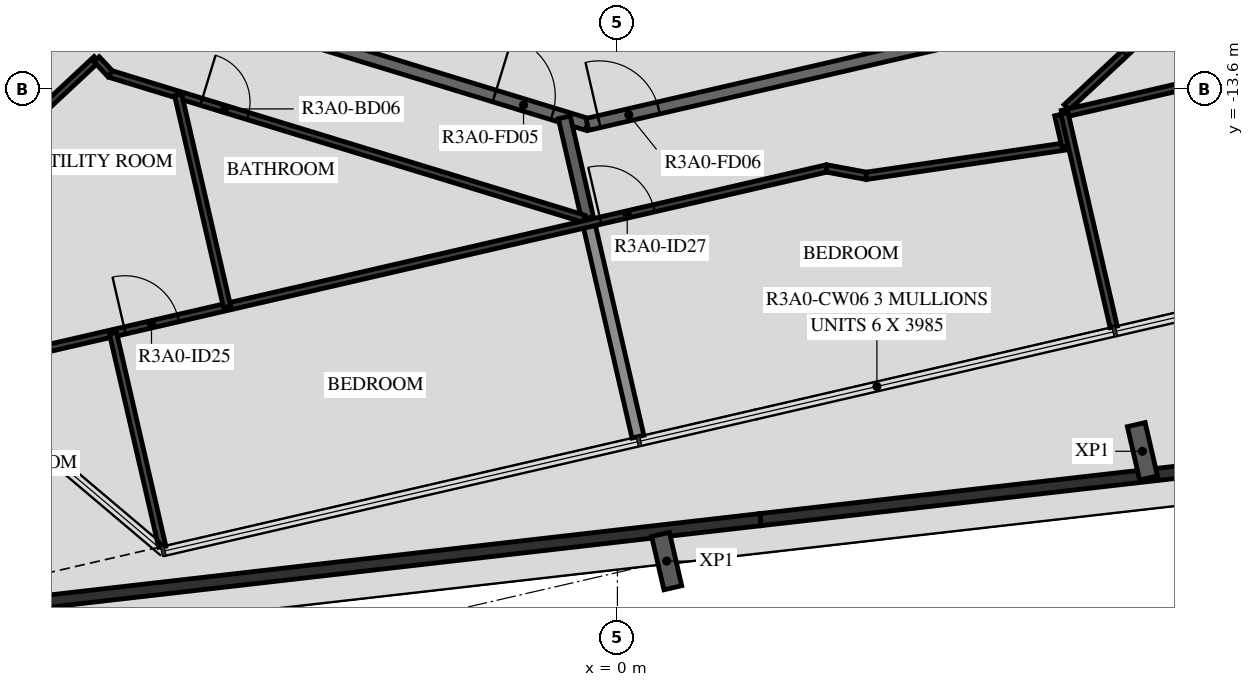
"""IFC4 building model, lengths in metres.
Left out: names, types, materials, properties, quantities, classifications, styles, units other than length and angle.
Written with IfcOpenShell. Run it as: python <this file> out.ifc"""

import sys

from ifc_helpers import new_model, si_unit, direction, frame, frame_2d, origin, origin_2d, place, context, subcontext, project, spatial, rectangle, i_section, extrude, element, fill, save


model = new_model("IFC4")
c1 = context("Model", 3, precision=1e-05, world=origin(), true_north=direction((0.0, 1.0)))
c2 = subcontext(c1, "Body", "Model", "MODEL_VIEW")
j1 = project(units=[si_unit("LENGTHUNIT", "METRE"), si_unit("PLANEANGLEUNIT", "RADIAN")], contexts=[c1])
p1 = place(None, origin())
s1 = spatial("IfcSite", under=j1, at=p1, CompositionType="ELEMENT")
p2 = place(p1, origin())
s2 = spatial("IfcBuilding", under=s1, at=p2, CompositionType="ELEMENT")
p3 = place(p2, frame((0.0, 0.0, 113.4)))
s3 = spatial("IfcBuildingStorey", under=s2, at=p3, CompositionType="ELEMENT", Elevation=113.4)
for number, where, z_axis, x_axis in (
    (1, (8.634, -19.55, -0.45), (0.0, 0.0, 1.0), (-0.974, -0.225, 0.0)),
    (2, (0.81, -21.356, -0.45), (0.0, 0.0, 1.0), (-0.974, -0.225, 0.0)),
):
    element("IfcColumn", number, at=place(p3, frame(where, z_axis=z_axis, x_axis=x_axis)), inside=s3, PredefinedType="COLUMN", context=c2, shape_type="SweptSolid", body=[
        extrude(i_section(OverallWidth=0.3, OverallDepth=0.9, WebThickness=0.019, FlangeThickness=0.035, FilletRadius=0.03, at=origin_2d()), origin(), (0.0, 0.0, 1.0), 3.57),
    ])
p4 = place(p3, frame((2.355, -20.674, 0.03), z_axis=(0.0, 0.0, 1.0), x_axis=(-0.993501379632, -0.11382007147, 0.0)))
e3 = element("IfcWall", 3, at=p4, inside=s3, PredefinedType="PARAPET", context=c2, shape_type="SweptSolid", body=[
    extrude(rectangle(XDim=15.836, YDim=0.2, at=frame_2d((7.918, 0.0))), origin(), (0.0, 0.0, 1.0), 1.5),
])
p5 = place(p3, frame((21.7, -18.47, 0.03), z_axis=(0.0, 0.0, 1.0), x_axis=(-0.993571254811, -0.113208487372, 0.0)))
e4 = element("IfcWall", 4, at=p5, inside=s3, PredefinedType="PARAPET", context=c2, shape_type="SweptSolid", body=[
    extrude(rectangle(XDim=19.469, YDim=0.2, at=frame_2d((9.735, 0.0))), origin(), (0.0, 0.0, 1.0), 1.5),
])
p6 = place(p3, frame((-7.516, -12.028, 0.0), z_axis=(0.0, 0.0, 1.0), x_axis=(0.956306642771, -0.292365533182, 0.0)))
e5 = element("IfcWall", 5, at=p6, inside=s3, PredefinedType="STANDARD", context=c2, shape_type="SweptSolid", body=[
    extrude(rectangle(XDim=7.342, YDim=0.2, at=frame_2d((3.671, 0.0))), origin(), (0.0, 0.0, 1.0), 3.12),
])
p7 = place(p6, frame((5.745, 0.0, 0.0)))
e6 = element("IfcOpeningElement", 6, at=p7, cuts=e5, PredefinedType="OPENING", context=c2, shape_type="SweptSolid", body=[
    extrude(rectangle(XDim=1.0, YDim=2.1, at=frame_2d((0.5, 1.05))), frame((0.0, 0.11, 0.0), z_axis=(0.0, -1.0, 0.0), x_axis=(1.0, 0.0, 0.0)), (0.0, 0.0, 1.0), 0.22),
])
p8 = place(p3, frame((-0.495, -14.175, 0.0), z_axis=(0.0, 0.0, 1.0), x_axis=(0.974376622151, 0.224922649383, 0.0)))
e7 = element("IfcWall", 7, at=p8, inside=s3, PredefinedType="STANDARD", context=c2, shape_type="SweptSolid", body=[
    extrude(rectangle(XDim=7.342, YDim=0.2, at=frame_2d((3.671, 0.0))), origin(), (0.0, 0.0, 1.0), 3.12),
])
p9 = place(p8, frame((0.2, 0.0, 0.0)))
e8 = element("IfcOpeningElement", 8, at=p9, cuts=e7, PredefinedType="OPENING", context=c2, shape_type="SweptSolid", body=[
    extrude(rectangle(XDim=1.0, YDim=2.1, at=frame_2d((0.5, 1.05))), frame((0.0, 0.11, 0.0), z_axis=(0.0, -1.0, 0.0), x_axis=(1.0, 0.0, 0.0)), (0.0, 0.0, 1.0), 0.22),
])
p10 = place(p3, frame((-0.492, -15.713, 0.0), z_axis=(0.0, 0.0, 1.0), x_axis=(-0.224974992875, 0.97436453783, 0.0)))
e9 = element("IfcWall", 9, at=p10, inside=s3, PredefinedType="STANDARD", context=c2, shape_type="SweptSolid", body=[
    extrude(rectangle(XDim=1.698, YDim=0.2, at=frame_2d((0.849, 0.0))), origin(), (0.0, 0.0, 1.0), 3.12),
])
p11 = place(p3, frame((0.338, -19.31, 0.0), z_axis=(0.0, 0.0, 1.0), x_axis=(-0.224943703639, 0.9743717618, 0.0)))
e10 = element("IfcWall", 10, at=p11, inside=s3, PredefinedType="STANDARD", context=c2, shape_type="SweptSolid", body=[
    extrude(rectangle(XDim=3.6, YDim=0.2, at=frame_2d((1.8, 0.0))), origin(), (0.0, 0.0, 1.0), 2.73),
])
p12 = place(p3, frame((-11.783, -16.104, 0.0), z_axis=(0.0, 0.0, 1.0), x_axis=(0.731365154613, 0.681986078023, 0.0)))
e11 = element("IfcWall", 11, at=p12, inside=s3, PredefinedType="PARTITIONING", context=c2, shape_type="SweptSolid", body=[
    extrude(rectangle(XDim=4.4, YDim=0.12, at=frame_2d((2.2, 0.0))), origin(), (0.0, 0.0, 1.0), 3.12),
])
p13 = place(p3, frame((-8.565, -13.103, 0.0), z_axis=(0.0, 0.0, 1.0), x_axis=(0.681636048219, -0.731691395172, 0.0)))
e12 = element("IfcWall", 12, at=p13, inside=s3, PredefinedType="PARTITIONING", context=c2, shape_type="SweptSolid", body=[
    extrude(rectangle(XDim=0.332, YDim=0.12, at=frame_2d((0.166, 0.0))), origin(), (0.0, 0.0, 1.0), 3.12),
])
p14 = place(p3, frame((-8.339, -13.345, 0.0), z_axis=(0.0, 0.0, 1.0), x_axis=(0.956310145342, -0.292354076276, 0.0)))
e13 = element("IfcWall", 13, at=p14, inside=s3, PredefinedType="PARTITIONING", context=c2, shape_type="SweptSolid", body=[
    extrude(rectangle(XDim=8.146, YDim=0.12, at=frame_2d((4.073, 0.0))), origin(), (0.0, 0.0, 1.0), 3.12),
])
p15 = place(p14, frame((1.565, 0.0, 0.0)))
e14 = element("IfcOpeningElement", 14, at=p15, cuts=e13, PredefinedType="OPENING", context=c2, shape_type="SweptSolid", body=[
    extrude(rectangle(XDim=0.8, YDim=2.1, at=frame_2d((0.4, 1.05))), frame((0.0, 0.07, 0.0), z_axis=(0.0, -1.0, 0.0), x_axis=(1.0, 0.0, 0.0)), (0.0, 0.0, 1.0), 0.14),
])
p16 = place(p3, frame((-14.736, -19.095, 0.0), z_axis=(0.0, 0.0, 1.0), x_axis=(0.974369132722, 0.224955091516, 0.0)))
e15 = element("IfcWall", 15, at=p16, inside=s3, PredefinedType="PARTITIONING", context=c2, shape_type="SweptSolid", body=[
    extrude(rectangle(XDim=18.654, YDim=0.12, at=frame_2d((9.327, 0.0))), origin(), (0.0, 0.0, 1.0), 3.12),
])
p17 = place(p16, frame((3.383, 0.0, 0.0)))
e16 = element("IfcOpeningElement", 16, at=p17, cuts=e15, PredefinedType="OPENING", context=c2, shape_type="SweptSolid", body=[
    extrude(rectangle(XDim=0.9, YDim=2.1, at=frame_2d((0.45, 1.05))), frame((0.0, 0.07, 0.0), z_axis=(0.0, -1.0, 0.0), x_axis=(1.0, 0.0, 0.0)), (0.0, 0.0, 1.0), 0.14),
])
p18 = place(p16, frame((6.81, 0.0, 0.0)))
e17 = element("IfcOpeningElement", 17, at=p18, cuts=e15, PredefinedType="OPENING", context=c2, shape_type="SweptSolid", body=[
    extrude(rectangle(XDim=0.9, YDim=2.1, at=frame_2d((0.45, 1.05))), frame((0.0, 0.07, 0.0), z_axis=(0.0, -1.0, 0.0), x_axis=(1.0, 0.0, 0.0)), (0.0, 0.0, 1.0), 0.14),
])
p19 = place(p16, frame((0.2, 0.0, 0.0)))
e18 = element("IfcOpeningElement", 18, at=p19, cuts=e15, PredefinedType="OPENING", context=c2, shape_type="SweptSolid", body=[
    extrude(rectangle(XDim=0.9, YDim=2.1, at=frame_2d((0.45, 1.05))), frame((0.0, 0.07, 0.0), z_axis=(0.0, -1.0, 0.0), x_axis=(1.0, 0.0, 0.0)), (0.0, 0.0, 1.0), 0.14),
])
p20 = place(p16, frame((14.839, 0.0, 0.0)))
e19 = element("IfcOpeningElement", 19, at=p20, cuts=e15, PredefinedType="OPENING", context=c2, shape_type="SweptSolid", body=[
    extrude(rectangle(XDim=0.9, YDim=2.1, at=frame_2d((0.45, 1.05))), frame((0.0, 0.07, 0.0), z_axis=(0.0, -1.0, 0.0), x_axis=(1.0, 0.0, 0.0)), (0.0, 0.0, 1.0), 0.14),
])
p21 = place(p3, frame((-6.419, -17.175, 0.0), z_axis=(0.0, 0.0, 1.0), x_axis=(-0.224979003559, 0.974363611778, 0.0)))
e20 = element("IfcWall", 20, at=p21, inside=s3, PredefinedType="PARTITIONING", context=c2, shape_type="SweptSolid", body=[
    extrude(rectangle(XDim=3.581, YDim=0.12, at=frame_2d((1.791, 0.0))), origin(), (0.0, 0.0, 1.0), 3.12),
])
p22 = place(p3, frame((-7.486, -21.116, 0.0), z_axis=(0.0, 0.0, 1.0), x_axis=(-0.224943703639, 0.9743717618, 0.0)))
e21 = element("IfcWall", 21, at=p22, inside=s3, PredefinedType="PARTITIONING", context=c2, shape_type="SweptSolid", body=[
    extrude(rectangle(XDim=3.6, YDim=0.12, at=frame_2d((1.8, 0.0))), origin(), (0.0, 0.0, 1.0), 2.73),
])
p23 = place(p3, frame((3.44, -14.899, 0.0), z_axis=(0.0, 0.0, 1.0), x_axis=(0.98314539863, -0.182825395264, 0.0)))
e22 = element("IfcWall", 22, at=p23, inside=s3, PredefinedType="PARTITIONING", context=c2, shape_type="SweptSolid", body=[
    extrude(rectangle(XDim=0.665, YDim=0.12, at=frame_2d((0.333, 0.0))), origin(), (0.0, 0.0, 1.0), 3.12),
])
p24 = place(p3, frame((4.094, -15.021, 0.0), z_axis=(0.0, 0.0, 1.0), x_axis=(0.989259616433, 0.146169118814, 0.0)))
e23 = element("IfcWall", 23, at=p24, inside=s3, PredefinedType="PARTITIONING", context=c2, shape_type="SweptSolid", body=[
    extrude(rectangle(XDim=3.311, YDim=0.12, at=frame_2d((1.655, 0.0))), origin(), (0.0, 0.0, 1.0), 3.12),
])
p25 = place(p3, frame((7.368, -14.537, 0.0), z_axis=(0.0, 0.0, 1.0), x_axis=(-0.224960301109, 0.974367929955, 0.0)))
e24 = element("IfcWall", 24, at=p25, inside=s3, PredefinedType="PARTITIONING", context=c2, shape_type="SweptSolid", body=[
    extrude(rectangle(XDim=0.531, YDim=0.12, at=frame_2d((0.265, 0.0))), origin(), (0.0, 0.0, 1.0), 3.12),
])
p26 = place(p3, frame((7.388, -13.894, 0.0), z_axis=(0.0, 0.0, 1.0), x_axis=(0.731339966659, 0.682013088707, 0.0)))
e25 = element("IfcWall", 25, at=p26, inside=s3, PredefinedType="PARTITIONING", context=c2, shape_type="SweptSolid", body=[
    extrude(rectangle(XDim=6.899, YDim=0.12, at=frame_2d((3.45, 0.0))), origin(), (0.0, 0.0, 1.0), 3.12),
])
p27 = place(p26, frame((1.3, 0.0, 0.0)))
e26 = element("IfcOpeningElement", 26, at=p27, cuts=e25, PredefinedType="OPENING", context=c2, shape_type="SweptSolid", body=[
    extrude(rectangle(XDim=0.8, YDim=2.1, at=frame_2d((0.4, 1.05))), frame((0.0, 0.07, 0.0), z_axis=(0.0, -1.0, 0.0), x_axis=(1.0, 0.0, 0.0)), (0.0, 0.0, 1.0), 0.14),
])
p28 = place(p3, frame((7.312, -14.005, 0.0), z_axis=(0.0, 0.0, 1.0), x_axis=(0.974367924791, 0.224960323474, 0.0)))
e27 = element("IfcWall", 27, at=p28, inside=s3, PredefinedType="PARTITIONING", context=c2, shape_type="SweptSolid", body=[
    extrude(rectangle(XDim=14.679, YDim=0.12, at=frame_2d((7.34, 0.0))), origin(), (0.0, 0.0, 1.0), 3.12),
])
p29 = place(p28, frame((6.433, 0.0, 0.0)))
e28 = element("IfcOpeningElement", 28, at=p29, cuts=e27, PredefinedType="OPENING", context=c2, shape_type="SweptSolid", body=[
    extrude(rectangle(XDim=0.9, YDim=2.1, at=frame_2d((0.45, 1.05))), frame((0.0, 0.07, 0.0), z_axis=(0.0, -1.0, 0.0), x_axis=(1.0, 0.0, 0.0)), (0.0, 0.0, 1.0), 0.14),
])
p30 = place(p28, frame((12.812, 0.0, 0.0)))
e29 = element("IfcOpeningElement", 29, at=p30, cuts=e27, PredefinedType="OPENING", context=c2, shape_type="SweptSolid", body=[
    extrude(rectangle(XDim=0.9, YDim=2.1, at=frame_2d((0.45, 1.05))), frame((0.0, 0.07, 0.0), z_axis=(0.0, -1.0, 0.0), x_axis=(1.0, 0.0, 0.0)), (0.0, 0.0, 1.0), 0.14),
])
p31 = place(p3, frame((8.161, -17.504, 0.0), z_axis=(0.0, 0.0, 1.0), x_axis=(-0.224943703639, 0.9743717618, 0.0)))
e30 = element("IfcWall", 30, at=p31, inside=s3, PredefinedType="PARTITIONING", context=c2, shape_type="SweptSolid", body=[
    extrude(rectangle(XDim=3.6, YDim=0.12, at=frame_2d((1.8, 0.0))), origin(), (0.0, 0.0, 1.0), 2.73),
])
p32 = place(p7, origin())
e31 = element("IfcDoor", 31, at=p32, inside=s3, OperationType="SINGLE_SWING_LEFT", PredefinedType="DOOR", context=c2, shape_type="SweptSolid", body=[
    extrude(rectangle(XDim=1.0, YDim=2.1, at=frame_2d((0.5, 1.05))), frame((0.0, 0.025, 0.0), z_axis=(0.0, -1.0, 0.0), x_axis=(1.0, 0.0, 0.0)), (0.0, 0.0, 1.0), 0.05),
])
fill(e6, e31)
p33 = place(p15, origin())
e32 = element("IfcDoor", 32, at=p33, inside=s3, OperationType="SINGLE_SWING_LEFT", PredefinedType="DOOR", context=c2, shape_type="SweptSolid", body=[
    extrude(rectangle(XDim=0.8, YDim=2.1, at=frame_2d((0.4, 1.05))), frame((0.0, 0.025, 0.0), z_axis=(0.0, -1.0, 0.0), x_axis=(1.0, 0.0, 0.0)), (0.0, 0.0, 1.0), 0.05),
])
fill(e14, e32)
p34 = place(p18, origin())
e33 = element("IfcDoor", 33, at=p34, inside=s3, OperationType="SINGLE_SWING_LEFT", PredefinedType="DOOR", context=c2, shape_type="SweptSolid", body=[
    extrude(rectangle(XDim=0.9, YDim=2.1, at=frame_2d((0.45, 1.05))), frame((0.0, 0.025, 0.0), z_axis=(0.0, -1.0, 0.0), x_axis=(1.0, 0.0, 0.0)), (0.0, 0.0, 1.0), 0.05),
])
fill(e17, e33)
p35 = place(p9, origin())
e34 = element("IfcDoor", 34, at=p35, inside=s3, OperationType="SINGLE_SWING_LEFT", PredefinedType="DOOR", context=c2, shape_type="SweptSolid", body=[
    extrude(rectangle(XDim=1.0, YDim=2.1, at=frame_2d((0.5, 1.05))), frame((0.0, 0.025, 0.0), z_axis=(0.0, -1.0, 0.0), x_axis=(1.0, 0.0, 0.0)), (0.0, 0.0, 1.0), 0.05),
])
fill(e8, e34)
p36 = place(p20, origin())
e35 = element("IfcDoor", 35, at=p36, inside=s3, OperationType="SINGLE_SWING_LEFT", PredefinedType="DOOR", context=c2, shape_type="SweptSolid", body=[
    extrude(rectangle(XDim=0.9, YDim=2.1, at=frame_2d((0.45, 1.05))), frame((0.0, 0.025, 0.0), z_axis=(0.0, -1.0, 0.0), x_axis=(1.0, 0.0, 0.0)), (0.0, 0.0, 1.0), 0.05),
])
fill(e19, e35)
p37 = place(p27, origin())
e36 = element("IfcDoor", 36, at=p37, inside=s3, OperationType="SINGLE_SWING_RIGHT", PredefinedType="DOOR", context=c2, shape_type="SweptSolid", body=[
    extrude(rectangle(XDim=0.8, YDim=2.1, at=frame_2d((0.4, 1.05))), frame((0.0, 0.025, 0.0), z_axis=(0.0, -1.0, 0.0), x_axis=(1.0, 0.0, 0.0)), (0.0, 0.0, 1.0), 0.05),
])
fill(e26, e36)
save(model, sys.argv[1])
